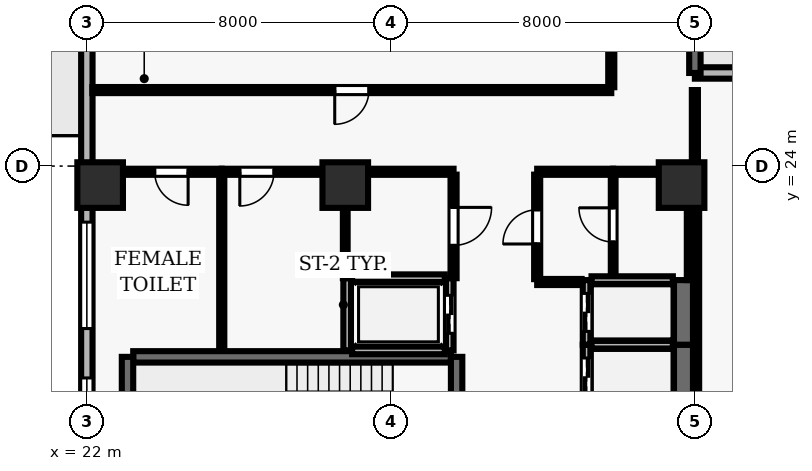
"""IFC4 building model, lengths in metres.
Left out: names, types, materials, properties, quantities, classifications, styles, units other than length and angle.
Written with IfcOpenShell. Run it as: python <this file> out.ifc"""

import sys

from ifc_helpers import new_model, si_unit, direction, frame, frame_2d, origin, origin_2d, place, context, subcontext, project, spatial, rectangle, extrude, element, fill, save


model = new_model("IFC4")
c1 = context("Model", 3, precision=1e-05, world=origin(), true_north=direction((0.0, 1.0)))
c2 = subcontext(c1, "Body", "Model", "MODEL_VIEW")
j1 = project(units=[si_unit("LENGTHUNIT", "METRE"), si_unit("PLANEANGLEUNIT", "RADIAN")], contexts=[c1])
p1 = place(None, origin())
s1 = spatial("IfcSite", under=j1, at=p1, CompositionType="ELEMENT")
p2 = place(p1, origin())
s2 = spatial("IfcBuilding", under=s1, at=p2, CompositionType="ELEMENT")
p3 = place(p2, frame((0.0, 0.0, 134.6)))
s3 = spatial("IfcBuildingStorey", under=s2, at=p3, CompositionType="ELEMENT", Elevation=134.6)
for number, where, z_axis, x_axis in (
    (1, (22.35, 23.5, 0.0), (0.0, 0.0, 1.0), (1.0, 0.0, 0.0)),
    (2, (28.8, 23.5, 0.0), (0.0, 0.0, 1.0), (1.0, 0.0, 0.0)),
    (3, (37.65, 23.5, 0.0), (0.0, 0.0, 1.0), (1.0, 0.0, 0.0)),
):
    element("IfcColumn", number, at=place(p3, frame(where, z_axis=z_axis, x_axis=x_axis)), inside=s3, PredefinedType="COLUMN", context=c2, shape_type="SweptSolid", body=[
        extrude(rectangle(XDim=1.2, YDim=1.2, at=origin_2d()), origin(), (0.0, 0.0, 1.0), 3.9),
    ])
p4 = place(p3, frame((45.499, 26.45, 0.0), z_axis=(0.0, 0.0, 1.0), x_axis=(-1.0, 0.0, 0.0)))
e4 = element("IfcWall", 4, at=p4, inside=s3, PredefinedType="SOLIDWALL", context=c2, shape_type="SweptSolid", body=[
    extrude(rectangle(XDim=7.499, YDim=0.3, at=frame_2d((3.75, 0.0))), origin(), (0.0, 0.0, 1.0), 3.69),
])
p5 = place(p4, frame((3.075, 0.0, 0.0)))
e5 = element("IfcOpeningElement", 5, at=p5, cuts=e4, PredefinedType="OPENING", context=c2, shape_type="SweptSolid", body=[
    extrude(rectangle(XDim=1.35, YDim=2.2, at=frame_2d((0.675, 1.1))), frame((0.0, 0.16, 0.0), z_axis=(0.0, -1.0, 0.0), x_axis=(1.0, 0.0, 0.0)), (0.0, 0.0, 1.0), 0.32),
])
p6 = place(p3, frame((38.0, 26.45, 0.0), z_axis=(0.0, 0.0, 1.0), x_axis=(0.0, 1.0, 0.0)))
e6 = element("IfcWall", 6, at=p6, inside=s3, PredefinedType="SOLIDWALL", context=c2, shape_type="SweptSolid", body=[
    extrude(rectangle(XDim=19.65, YDim=0.3, at=frame_2d((9.825, 0.0))), origin(), (0.0, 0.0, 1.0), 3.69),
])
p7 = place(p6, frame((11.25, 0.0, 0.0)))
e7 = element("IfcOpeningElement", 7, at=p7, cuts=e6, PredefinedType="OPENING", context=c2, shape_type="SweptSolid", body=[
    extrude(rectangle(XDim=1.0, YDim=2.2, at=frame_2d((0.5, 1.1))), frame((0.0, 0.16, 0.0), z_axis=(0.0, -1.0, 0.0), x_axis=(1.0, 0.0, 0.0)), (0.0, 0.0, 1.0), 0.32),
])
p8 = place(p6, frame((15.625, 0.0, 0.9)))
e8 = element("IfcOpeningElement", 8, at=p8, cuts=e6, PredefinedType="OPENING", context=c2, shape_type="SweptSolid", body=[
    extrude(rectangle(XDim=2.4, YDim=1.6, at=frame_2d((1.2, 0.8))), frame((0.0, 0.16, 0.0), z_axis=(0.0, -1.0, 0.0), x_axis=(1.0, 0.0, 0.0)), (0.0, 0.0, 1.0), 0.32),
])
p9 = place(p3, frame((22.0, 46.1, 0.0), z_axis=(0.0, 0.0, 1.0), x_axis=(0.0, -1.0, 0.0)))
e9 = element("IfcWall", 9, at=p9, inside=s3, PredefinedType="SOLIDWALL", context=c2, shape_type="SweptSolid", body=[
    extrude(rectangle(XDim=43.6, YDim=0.3, at=frame_2d((21.8, 0.0))), origin(), (0.0, 0.0, 1.0), 3.69),
])
p10 = place(p9, frame((12.7, 0.0, 0.0)))
e10 = element("IfcOpeningElement", 10, at=p10, cuts=e9, PredefinedType="OPENING", context=c2, shape_type="SweptSolid", body=[
    extrude(rectangle(XDim=1.0, YDim=2.2, at=frame_2d((0.5, 1.1))), frame((0.0, 0.16, 0.0), z_axis=(0.0, -1.0, 0.0), x_axis=(1.0, 0.0, 0.0)), (0.0, 0.0, 1.0), 0.32),
])
p11 = place(p9, frame((1.325, 0.0, 0.9)))
e11 = element("IfcOpeningElement", 11, at=p11, cuts=e9, PredefinedType="OPENING", context=c2, shape_type="SweptSolid", body=[
    extrude(rectangle(XDim=2.8, YDim=1.8, at=frame_2d((1.4, 0.9))), frame((0.0, 0.16, 0.0), z_axis=(0.0, -1.0, 0.0), x_axis=(1.0, 0.0, 0.0)), (0.0, 0.0, 1.0), 0.32),
])
p12 = place(p9, frame((23.575, 0.0, 0.9)))
e12 = element("IfcOpeningElement", 12, at=p12, cuts=e9, PredefinedType="OPENING", context=c2, shape_type="SweptSolid", body=[
    extrude(rectangle(XDim=2.8, YDim=1.8, at=frame_2d((1.4, 0.9))), frame((0.0, 0.16, 0.0), z_axis=(0.0, -1.0, 0.0), x_axis=(1.0, 0.0, 0.0)), (0.0, 0.0, 1.0), 0.32),
])
p13 = place(p9, frame((27.675, 0.0, 0.9)))
e13 = element("IfcOpeningElement", 13, at=p13, cuts=e9, PredefinedType="OPENING", context=c2, shape_type="SweptSolid", body=[
    extrude(rectangle(XDim=2.8, YDim=1.8, at=frame_2d((1.4, 0.9))), frame((0.0, 0.16, 0.0), z_axis=(0.0, -1.0, 0.0), x_axis=(1.0, 0.0, 0.0)), (0.0, 0.0, 1.0), 0.32),
])
p14 = place(p9, frame((34.025, 0.0, 0.9)))
e14 = element("IfcOpeningElement", 14, at=p14, cuts=e9, PredefinedType="OPENING", context=c2, shape_type="SweptSolid", body=[
    extrude(rectangle(XDim=2.8, YDim=1.8, at=frame_2d((1.4, 0.9))), frame((0.0, 0.16, 0.0), z_axis=(0.0, -1.0, 0.0), x_axis=(1.0, 0.0, 0.0)), (0.0, 0.0, 1.0), 0.32),
])
p15 = place(p3, frame((31.58, 18.98, 0.0), z_axis=(0.0, 0.0, 1.0), x_axis=(-1.0, 0.0, 0.0)))
e15 = element("IfcWall", 15, at=p15, inside=s3, PredefinedType="SHEAR", context=c2, shape_type="SweptSolid", body=[
    extrude(rectangle(XDim=8.36, YDim=0.3, at=frame_2d((4.18, 0.0))), origin(), (0.0, 0.0, 1.0), 3.69),
])
p16 = place(p3, frame((23.07, 18.98, 0.0), z_axis=(0.0, 0.0, 1.0), x_axis=(0.0, -1.0, 0.0)))
e16 = element("IfcWall", 16, at=p16, inside=s3, PredefinedType="SHEAR", context=c2, shape_type="SweptSolid", body=[
    extrude(rectangle(XDim=3.51, YDim=0.3, at=frame_2d((1.755, 0.0))), origin(), (0.0, 0.0, 1.0), 3.69),
])
p17 = place(p3, frame((31.73, 15.47, 0.0), z_axis=(0.0, 0.0, 1.0), x_axis=(0.0, 1.0, 0.0)))
e17 = element("IfcWall", 17, at=p17, inside=s3, PredefinedType="SHEAR", context=c2, shape_type="SweptSolid", body=[
    extrude(rectangle(XDim=3.51, YDim=0.3, at=frame_2d((1.755, 0.0))), origin(), (0.0, 0.0, 1.0), 3.69),
])
p18 = place(p17, frame((1.18, 0.0, 0.0)))
e18 = element("IfcOpeningElement", 18, at=p18, cuts=e17, PredefinedType="OPENING", context=c2, shape_type="SweptSolid", body=[
    extrude(rectangle(XDim=1.15, YDim=2.15, at=frame_2d((0.575, 1.075))), frame((0.0, 0.16, 0.0), z_axis=(0.0, -1.0, 0.0), x_axis=(1.0, 0.0, 0.0)), (0.0, 0.0, 1.0), 0.32),
])
p19 = place(p3, frame((35.15, 19.3, 0.0), z_axis=(0.0, 0.0, 1.0), x_axis=(0.0, -1.0, 0.0)))
e19 = element("IfcWall", 19, at=p19, inside=s3, PredefinedType="SOLIDWALL", context=c2, shape_type="SweptSolid", body=[
    extrude(rectangle(XDim=1.7, YDim=0.2, at=frame_2d((0.85, 0.0))), origin(), (0.0, 0.0, 1.0), 3.69),
])
p20 = place(p19, frame((0.35, 0.0, 0.0)))
e20 = element("IfcOpeningElement", 20, at=p20, cuts=e19, PredefinedType="OPENING", context=c2, shape_type="SweptSolid", body=[
    extrude(rectangle(XDim=1.0, YDim=2.1, at=frame_2d((0.5, 1.05))), frame((0.0, 0.11, 0.0), z_axis=(0.0, -1.0, 0.0), x_axis=(1.0, 0.0, 0.0)), (0.0, 0.0, 1.0), 0.22),
])
p21 = place(p3, frame((37.7, 17.6, 0.0), z_axis=(0.0, 0.0, 1.0), x_axis=(0.0, 1.0, 0.0)))
e21 = element("IfcWall", 21, at=p21, inside=s3, PredefinedType="SHEAR", context=c2, shape_type="SweptSolid", body=[
    extrude(rectangle(XDim=1.7, YDim=0.5, at=frame_2d((0.85, 0.0))), origin(), (0.0, 0.0, 1.0), 3.69),
])
p22 = place(p3, frame((37.42, 19.3, 0.0), z_axis=(0.0, 0.0, 1.0), x_axis=(-1.0, 0.0, 0.0)))
e22 = element("IfcWall", 22, at=p22, inside=s3, PredefinedType="SOLIDWALL", context=c2, shape_type="SweptSolid", body=[
    extrude(rectangle(XDim=2.14, YDim=0.2, at=frame_2d((1.07, 0.0))), origin(), (0.0, 0.0, 1.0), 3.69),
])
p23 = place(p3, frame((35.15, 21.0, 0.0), z_axis=(0.0, 0.0, 1.0), x_axis=(0.0, -1.0, 0.0)))
e23 = element("IfcWall", 23, at=p23, inside=s3, PredefinedType="SOLIDWALL", context=c2, shape_type="SweptSolid", body=[
    extrude(rectangle(XDim=1.7, YDim=0.2, at=frame_2d((0.85, 0.0))), origin(), (0.0, 0.0, 1.0), 3.69),
])
p24 = place(p23, frame((0.35, 0.0, 0.0)))
e24 = element("IfcOpeningElement", 24, at=p24, cuts=e23, PredefinedType="OPENING", context=c2, shape_type="SweptSolid", body=[
    extrude(rectangle(XDim=1.0, YDim=2.1, at=frame_2d((0.5, 1.05))), frame((0.0, 0.11, 0.0), z_axis=(0.0, -1.0, 0.0), x_axis=(1.0, 0.0, 0.0)), (0.0, 0.0, 1.0), 0.22),
])
p25 = place(p3, frame((37.7, 19.3, 0.0), z_axis=(0.0, 0.0, 1.0), x_axis=(0.0, 1.0, 0.0)))
e25 = element("IfcWall", 25, at=p25, inside=s3, PredefinedType="SHEAR", context=c2, shape_type="SweptSolid", body=[
    extrude(rectangle(XDim=1.7, YDim=0.5, at=frame_2d((0.85, 0.0))), origin(), (0.0, 0.0, 1.0), 3.69),
])
p26 = place(p3, frame((37.42, 21.0, 0.0), z_axis=(0.0, 0.0, 1.0), x_axis=(-1.0, 0.0, 0.0)))
e26 = element("IfcWall", 26, at=p26, inside=s3, PredefinedType="SOLIDWALL", context=c2, shape_type="SweptSolid", body=[
    extrude(rectangle(XDim=2.14, YDim=0.2, at=frame_2d((1.07, 0.0))), origin(), (0.0, 0.0, 1.0), 3.69),
])
p27 = place(p3, frame((28.85, 21.05, 0.0), z_axis=(0.0, 0.0, 1.0), x_axis=(0.0, -1.0, 0.0)))
e27 = element("IfcWall", 27, at=p27, inside=s3, PredefinedType="SOLIDWALL", context=c2, shape_type="SweptSolid", body=[
    extrude(rectangle(XDim=1.9, YDim=0.2, at=frame_2d((0.95, 0.0))), origin(), (0.0, 0.0, 1.0), 3.69),
])
p28 = place(p3, frame((31.55, 19.15, 0.0), z_axis=(0.0, 0.0, 1.0), x_axis=(0.0, 1.0, 0.0)))
e28 = element("IfcWall", 28, at=p28, inside=s3, PredefinedType="SOLIDWALL", context=c2, shape_type="SweptSolid", body=[
    extrude(rectangle(XDim=1.9, YDim=0.2, at=frame_2d((0.95, 0.0))), origin(), (0.0, 0.0, 1.0), 3.69),
])
p29 = place(p28, frame((0.45, 0.0, 0.0)))
e29 = element("IfcOpeningElement", 29, at=p29, cuts=e28, PredefinedType="OPENING", context=c2, shape_type="SweptSolid", body=[
    extrude(rectangle(XDim=1.0, YDim=2.1, at=frame_2d((0.5, 1.05))), frame((0.0, 0.11, 0.0), z_axis=(0.0, -1.0, 0.0), x_axis=(1.0, 0.0, 0.0)), (0.0, 0.0, 1.0), 0.22),
])
for number, where, z_axis, x_axis in (
    (30, (28.98, 19.15, 0.0), (0.0, 0.0, 1.0), (1.0, 0.0, 0.0)),
    (31, (31.42, 21.05, 0.0), (0.0, 0.0, 1.0), (-1.0, 0.0, 0.0)),
):
    element("IfcWall", number, at=place(p3, frame(where, z_axis=z_axis, x_axis=x_axis)), inside=s3, PredefinedType="SOLIDWALL", context=c2, shape_type="SweptSolid", body=[
        extrude(rectangle(XDim=2.44, YDim=0.2, at=frame_2d((1.22, 0.0))), origin(), (0.0, 0.0, 1.0), 3.69),
    ])
p30 = place(p3, frame((25.55, 23.85, 0.0), z_axis=(0.0, 0.0, 1.0), x_axis=(-1.0, 0.0, 0.0)))
e32 = element("IfcWall", 32, at=p30, inside=s3, PredefinedType="PARTITIONING", context=c2, shape_type="SweptSolid", body=[
    extrude(rectangle(XDim=3.35, YDim=0.16, at=frame_2d((1.675, 0.0))), origin(), (0.0, 0.0, 1.0), 3.074),
])
p31 = place(p30, frame((0.885, 0.0, 0.0)))
e33 = element("IfcOpeningElement", 33, at=p31, cuts=e32, PredefinedType="OPENING", context=c2, shape_type="SweptSolid", body=[
    extrude(rectangle(XDim=0.88, YDim=2.1, at=frame_2d((0.44, 1.05))), frame((0.0, 0.09, 0.0), z_axis=(0.0, -1.0, 0.0), x_axis=(1.0, 0.0, 0.0)), (0.0, 0.0, 1.0), 0.18),
])
p32 = place(p3, frame((28.8, 23.85, 0.0), z_axis=(0.0, 0.0, 1.0), x_axis=(-1.0, 0.0, 0.0)))
e34 = element("IfcWall", 34, at=p32, inside=s3, PredefinedType="PARTITIONING", context=c2, shape_type="SweptSolid", body=[
    extrude(rectangle(XDim=3.25, YDim=0.16, at=frame_2d((1.625, 0.0))), origin(), (0.0, 0.0, 1.0), 3.074),
])
p33 = place(p32, frame((1.875, 0.0, 0.0)))
e35 = element("IfcOpeningElement", 35, at=p33, cuts=e34, PredefinedType="OPENING", context=c2, shape_type="SweptSolid", body=[
    extrude(rectangle(XDim=0.9, YDim=2.1, at=frame_2d((0.45, 1.05))), frame((0.0, 0.09, 0.0), z_axis=(0.0, -1.0, 0.0), x_axis=(1.0, 0.0, 0.0)), (0.0, 0.0, 1.0), 0.18),
])
p34 = place(p3, frame((31.65, 23.85, 0.0), z_axis=(0.0, 0.0, 1.0), x_axis=(-1.0, 0.0, 0.0)))
e36 = element("IfcWall", 36, at=p34, inside=s3, PredefinedType="PARTITIONING", context=c2, shape_type="SweptSolid", body=[
    extrude(rectangle(XDim=2.85, YDim=0.16, at=frame_2d((1.425, 0.0))), origin(), (0.0, 0.0, 1.0), 3.074),
])
p35 = place(p3, frame((35.02, 20.95, 0.0), z_axis=(0.0, 0.0, 1.0), x_axis=(-1.0, 0.0, 0.0)))
e37 = element("IfcWall", 37, at=p35, inside=s3, PredefinedType="PARTITIONING", context=c2, shape_type="SweptSolid", body=[
    extrude(rectangle(XDim=1.17, YDim=0.16, at=frame_2d((0.585, 0.0))), origin(), (0.0, 0.0, 1.0), 3.69),
])
p36 = place(p3, frame((35.8, 26.0, 0.0), z_axis=(0.0, 0.0, 1.0), x_axis=(-1.0, 0.0, 0.0)))
e38 = element("IfcWall", 38, at=p36, inside=s3, PredefinedType="PARTITIONING", context=c2, shape_type="SweptSolid", body=[
    extrude(rectangle(XDim=13.655, YDim=0.16, at=frame_2d((6.828, 0.0))), origin(), (0.0, 0.0, 1.0), 3.69),
])
p37 = place(p36, frame((6.377, 0.0, 0.0)))
e39 = element("IfcOpeningElement", 39, at=p37, cuts=e38, PredefinedType="OPENING", context=c2, shape_type="SweptSolid", body=[
    extrude(rectangle(XDim=0.9, YDim=2.1, at=frame_2d((0.45, 1.05))), frame((0.0, 0.09, 0.0), z_axis=(0.0, -1.0, 0.0), x_axis=(1.0, 0.0, 0.0)), (0.0, 0.0, 1.0), 0.18),
])
for number, where, z_axis, x_axis in (
    (40, (35.85, 23.85, 0.0), (0.0, 0.0, 1.0), (-1.0, 0.0, 0.0)),
    (41, (37.85, 23.85, 0.0), (0.0, 0.0, 1.0), (-1.0, 0.0, 0.0)),
):
    element("IfcWall", number, at=place(p3, frame(where, z_axis=z_axis, x_axis=x_axis)), inside=s3, PredefinedType="PARTITIONING", context=c2, shape_type="SweptSolid", body=[
        extrude(rectangle(XDim=2.0, YDim=0.16, at=frame_2d((1.0, 0.0))), origin(), (0.0, 0.0, 1.0), 3.074),
    ])
p38 = place(p3, frame((25.55, 19.16, 0.0), z_axis=(0.0, 0.0, 1.0), x_axis=(0.0, 1.0, 0.0)))
e42 = element("IfcWall", 42, at=p38, inside=s3, PredefinedType="PARTITIONING", context=c2, shape_type="SweptSolid", body=[
    extrude(rectangle(XDim=4.615, YDim=0.135, at=frame_2d((2.308, 0.0))), origin(), (0.0, 0.0, 1.0), 3.69),
])
p39 = place(p3, frame((28.8, 23.775, 0.0), z_axis=(0.0, 0.0, 1.0), x_axis=(0.0, -1.0, 0.0)))
e43 = element("IfcWall", 43, at=p39, inside=s3, PredefinedType="PARTITIONING", context=c2, shape_type="SweptSolid", body=[
    extrude(rectangle(XDim=2.725, YDim=0.125, at=frame_2d((1.362, 0.0))), origin(), (0.0, 0.0, 1.0), 3.69),
])
p40 = place(p3, frame((31.65, 23.775, 0.0), z_axis=(0.0, 0.0, 1.0), x_axis=(0.0, -1.0, 0.0)))
e44 = element("IfcWall", 44, at=p40, inside=s3, PredefinedType="PARTITIONING", context=c2, shape_type="SweptSolid", body=[
    extrude(rectangle(XDim=2.725, YDim=0.16, at=frame_2d((1.362, 0.0))), origin(), (0.0, 0.0, 1.0), 3.69),
])
p41 = place(p40, frame((0.862, 0.0, 0.0)))
e45 = element("IfcOpeningElement", 45, at=p41, cuts=e44, PredefinedType="OPENING", context=c2, shape_type="SweptSolid", body=[
    extrude(rectangle(XDim=1.0, YDim=2.1, at=frame_2d((0.5, 1.05))), frame((0.0, 0.09, 0.0), z_axis=(0.0, -1.0, 0.0), x_axis=(1.0, 0.0, 0.0)), (0.0, 0.0, 1.0), 0.18),
])
p42 = place(p3, frame((33.85, 21.025, 0.0), z_axis=(0.0, 0.0, 1.0), x_axis=(0.0, 1.0, 0.0)))
e46 = element("IfcWall", 46, at=p42, inside=s3, PredefinedType="PARTITIONING", context=c2, shape_type="SweptSolid", body=[
    extrude(rectangle(XDim=2.75, YDim=0.16, at=frame_2d((1.375, 0.0))), origin(), (0.0, 0.0, 1.0), 3.69),
])
p43 = place(p42, frame((0.925, 0.0, 0.0)))
e47 = element("IfcOpeningElement", 47, at=p43, cuts=e46, PredefinedType="OPENING", context=c2, shape_type="SweptSolid", body=[
    extrude(rectangle(XDim=0.9, YDim=2.1, at=frame_2d((0.45, 1.05))), frame((0.0, 0.09, 0.0), z_axis=(0.0, -1.0, 0.0), x_axis=(1.0, 0.0, 0.0)), (0.0, 0.0, 1.0), 0.18),
])
p44 = place(p3, frame((35.8, 37.693, 0.0), z_axis=(0.0, 0.0, 1.0), x_axis=(0.0, -1.0, 0.0)))
e48 = element("IfcWall", 48, at=p44, inside=s3, PredefinedType="PARTITIONING", context=c2, shape_type="SweptSolid", body=[
    extrude(rectangle(XDim=11.618, YDim=0.16, at=frame_2d((5.809, 0.0))), origin(), (0.0, 0.0, 1.0), 3.69),
])
p45 = place(p3, frame((35.85, 21.13, 0.0), z_axis=(0.0, 0.0, 1.0), x_axis=(0.0, 1.0, 0.0)))
e49 = element("IfcWall", 49, at=p45, inside=s3, PredefinedType="PARTITIONING", context=c2, shape_type="SweptSolid", body=[
    extrude(rectangle(XDim=2.645, YDim=0.125, at=frame_2d((1.323, 0.0))), origin(), (0.0, 0.0, 1.0), 3.69),
])
p46 = place(p45, frame((0.872, 0.0, 0.0)))
e50 = element("IfcOpeningElement", 50, at=p46, cuts=e49, PredefinedType="OPENING", context=c2, shape_type="SweptSolid", body=[
    extrude(rectangle(XDim=0.9, YDim=2.1, at=frame_2d((0.45, 1.05))), frame((0.0, 0.073, 0.0), z_axis=(0.0, -1.0, 0.0), x_axis=(1.0, 0.0, 0.0)), (0.0, 0.0, 1.0), 0.145),
])
p47 = place(p3, frame((37.85, 21.0, 0.0), z_axis=(0.0, 0.0, 1.0), x_axis=(0.0, 1.0, 0.0)))
e51 = element("IfcWall", 51, at=p47, inside=s3, PredefinedType="PARTITIONING", context=c2, shape_type="SweptSolid", body=[
    extrude(rectangle(XDim=2.775, YDim=0.125, at=frame_2d((1.387, 0.0))), origin(), (0.0, 0.0, 1.0), 3.074),
])
p48 = place(p3, frame((38.0, 23.85, 0.0), z_axis=(0.0, 0.0, 1.0), x_axis=(0.0, 1.0, 0.0)))
e52 = element("IfcWall", 52, at=p48, inside=s3, PredefinedType="PARTITIONING", context=c2, shape_type="SweptSolid", body=[
    extrude(rectangle(XDim=2.15, YDim=0.16, at=frame_2d((1.075, 0.0))), origin(), (0.0, 0.0, 1.0), 3.074),
])
p49 = place(p3, frame((38.05, 23.85, 0.0), z_axis=(0.0, 0.0, 1.0), x_axis=(0.0, -1.0, 0.0)))
e53 = element("IfcWall", 53, at=p49, inside=s3, PredefinedType="PARTITIONING", context=c2, shape_type="SweptSolid", body=[
    extrude(rectangle(XDim=7.775, YDim=0.125, at=frame_2d((3.888, 0.0))), origin(), (0.0, 0.0, 1.0), 3.074),
])
p50 = place(p12, origin())
e54 = element("IfcWindow", 54, at=p50, inside=s3, PartitioningType="SINGLE_PANEL", PredefinedType="WINDOW", context=c2, shape_type="SweptSolid", body=[
    extrude(rectangle(XDim=2.8, YDim=1.8, at=frame_2d((1.4, 0.9))), frame((0.0, 0.03, 0.0), z_axis=(0.0, -1.0, 0.0), x_axis=(1.0, 0.0, 0.0)), (0.0, 0.0, 1.0), 0.06),
])
fill(e12, e54)
p51 = place(p13, origin())
e55 = element("IfcWindow", 55, at=p51, inside=s3, PartitioningType="SINGLE_PANEL", PredefinedType="WINDOW", context=c2, shape_type="SweptSolid", body=[
    extrude(rectangle(XDim=2.8, YDim=1.8, at=frame_2d((1.4, 0.9))), frame((0.0, 0.03, 0.0), z_axis=(0.0, -1.0, 0.0), x_axis=(1.0, 0.0, 0.0)), (0.0, 0.0, 1.0), 0.06),
])
fill(e13, e55)
p52 = place(p20, origin())
e56 = element("IfcDoor", 56, at=p52, inside=s3, OperationType="DOUBLE_DOOR_SLIDING", PredefinedType="DOOR", context=c2, shape_type="SweptSolid", body=[
    extrude(rectangle(XDim=1.0, YDim=2.1, at=frame_2d((0.5, 1.05))), frame((0.0, 0.025, 0.0), z_axis=(0.0, -1.0, 0.0), x_axis=(1.0, 0.0, 0.0)), (0.0, 0.0, 1.0), 0.05),
])
fill(e20, e56)
p53 = place(p24, origin())
e57 = element("IfcDoor", 57, at=p53, inside=s3, OperationType="DOUBLE_DOOR_SLIDING", PredefinedType="DOOR", context=c2, shape_type="SweptSolid", body=[
    extrude(rectangle(XDim=1.0, YDim=2.1, at=frame_2d((0.5, 1.05))), frame((0.0, 0.025, 0.0), z_axis=(0.0, -1.0, 0.0), x_axis=(1.0, 0.0, 0.0)), (0.0, 0.0, 1.0), 0.05),
])
fill(e24, e57)
p54 = place(p29, origin())
e58 = element("IfcDoor", 58, at=p54, inside=s3, OperationType="DOUBLE_DOOR_SLIDING", PredefinedType="DOOR", context=c2, shape_type="SweptSolid", body=[
    extrude(rectangle(XDim=1.0, YDim=2.1, at=frame_2d((0.5, 1.05))), frame((0.0, 0.025, 0.0), z_axis=(0.0, -1.0, 0.0), x_axis=(1.0, 0.0, 0.0)), (0.0, 0.0, 1.0), 0.05),
])
fill(e29, e58)
p55 = place(p43, origin())
e59 = element("IfcDoor", 59, at=p55, inside=s3, OperationType="SINGLE_SWING_LEFT", PredefinedType="DOOR", context=c2, shape_type="SweptSolid", body=[
    extrude(rectangle(XDim=0.9, YDim=2.1, at=frame_2d((0.45, 1.05))), frame((0.0, 0.025, 0.0), z_axis=(0.0, -1.0, 0.0), x_axis=(1.0, 0.0, 0.0)), (0.0, 0.0, 1.0), 0.05),
])
fill(e47, e59)
p56 = place(p46, origin())
e60 = element("IfcDoor", 60, at=p56, inside=s3, OperationType="SINGLE_SWING_RIGHT", PredefinedType="DOOR", context=c2, shape_type="SweptSolid", body=[
    extrude(rectangle(XDim=0.9, YDim=2.1, at=frame_2d((0.45, 1.05))), frame((0.0, 0.025, 0.0), z_axis=(0.0, -1.0, 0.0), x_axis=(1.0, 0.0, 0.0)), (0.0, 0.0, 1.0), 0.05),
])
fill(e50, e60)
p57 = place(p41, origin())
e61 = element("IfcDoor", 61, at=p57, inside=s3, OperationType="SINGLE_SWING_LEFT", PredefinedType="DOOR", context=c2, shape_type="SweptSolid", body=[
    extrude(rectangle(XDim=1.0, YDim=2.1, at=frame_2d((0.5, 1.05))), frame((0.0, 0.025, 0.0), z_axis=(0.0, -1.0, 0.0), x_axis=(1.0, 0.0, 0.0)), (0.0, 0.0, 1.0), 0.05),
])
fill(e45, e61)
p58 = place(p31, origin())
e62 = element("IfcDoor", 62, at=p58, inside=s3, OperationType="SINGLE_SWING_LEFT", PredefinedType="DOOR", context=c2, shape_type="SweptSolid", body=[
    extrude(rectangle(XDim=0.88, YDim=2.1, at=frame_2d((0.44, 1.05))), frame((0.0, 0.025, 0.0), z_axis=(0.0, -1.0, 0.0), x_axis=(1.0, 0.0, 0.0)), (0.0, 0.0, 1.0), 0.05),
])
fill(e33, e62)
p59 = place(p33, origin())
e63 = element("IfcDoor", 63, at=p59, inside=s3, OperationType="SINGLE_SWING_RIGHT", PredefinedType="DOOR", context=c2, shape_type="SweptSolid", body=[
    extrude(rectangle(XDim=0.9, YDim=2.1, at=frame_2d((0.45, 1.05))), frame((0.0, 0.025, 0.0), z_axis=(0.0, -1.0, 0.0), x_axis=(1.0, 0.0, 0.0)), (0.0, 0.0, 1.0), 0.05),
])
fill(e35, e63)
p60 = place(p37, origin())
e64 = element("IfcDoor", 64, at=p60, inside=s3, OperationType="SINGLE_SWING_RIGHT", PredefinedType="DOOR", context=c2, shape_type="SweptSolid", body=[
    extrude(rectangle(XDim=0.9, YDim=2.1, at=frame_2d((0.45, 1.05))), frame((0.0, 0.025, 0.0), z_axis=(0.0, -1.0, 0.0), x_axis=(1.0, 0.0, 0.0)), (0.0, 0.0, 1.0), 0.05),
])
fill(e39, e64)
save(model, sys.argv[1])
